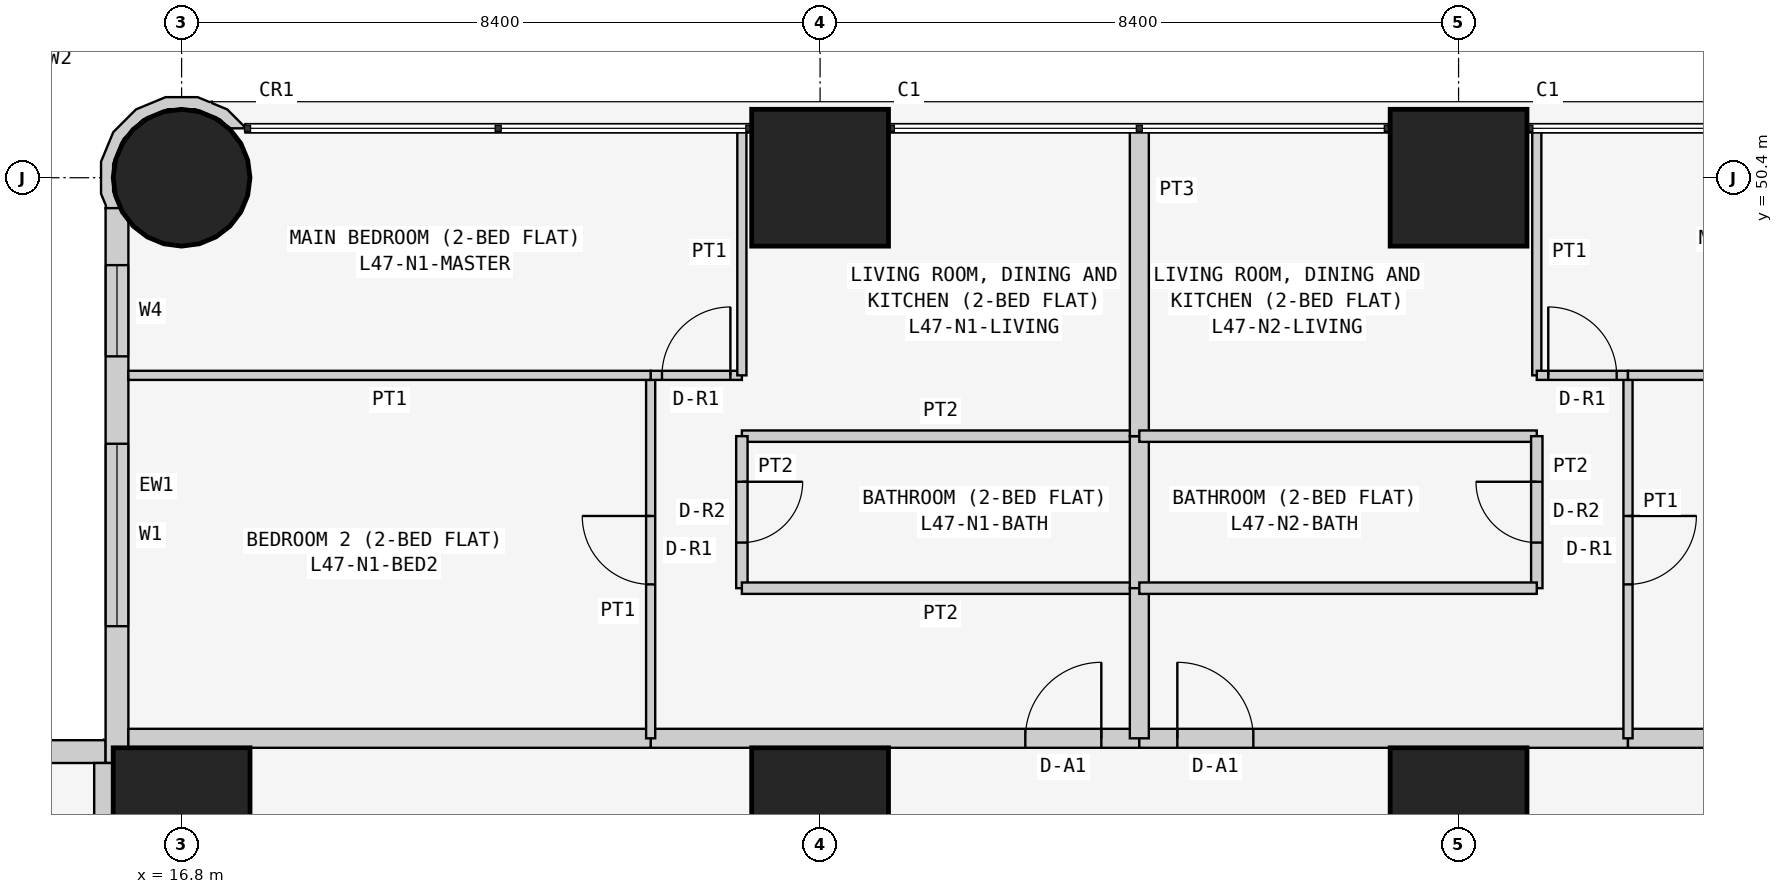
"""IFC4 building model, lengths in metres.
Left out: names, types, materials, properties, quantities, classifications, styles, units other than length and angle.
Written with IfcOpenShell. Run it as: python <this file> out.ifc"""

import sys

from ifc_helpers import new_model, si_unit, direction, frame, frame_2d, origin, origin_2d, place, context, subcontext, project, spatial, polyline, rectangle, circle, outline, extrude, element, fill, save


model = new_model("IFC4")
c1 = context("Model", 3, precision=1e-05, world=origin(), true_north=direction((0.0, 1.0)))
c2 = subcontext(c1, "Body", "Model", "MODEL_VIEW")
j1 = project(units=[si_unit("LENGTHUNIT", "METRE"), si_unit("PLANEANGLEUNIT", "RADIAN")], contexts=[c1])
p1 = place(None, origin())
s1 = spatial("IfcSite", under=j1, at=p1, CompositionType="ELEMENT")
p2 = place(p1, origin())
s2 = spatial("IfcBuilding", under=s1, at=p2, CompositionType="ELEMENT")
p3 = place(p2, frame((0.0, 0.0, 183.3)))
s3 = spatial("IfcBuildingStorey", under=s2, at=p3, CompositionType="ELEMENT", Elevation=183.3)
p4 = place(p3, frame((16.8, 42.0, 0.0), z_axis=(0.0, 0.0, 1.0), x_axis=(1.0, 0.0, 0.0)))
e1 = element("IfcColumn", 1, at=p4, inside=s3, PredefinedType="COLUMN", context=c2, shape_type="SweptSolid", body=[
    extrude(rectangle(XDim=1.8, YDim=1.8, at=origin_2d()), origin(), (0.0, 0.0, 1.0), 3.6),
])
p5 = place(p3, frame((16.8, 50.4, 0.0), z_axis=(0.0, 0.0, 1.0), x_axis=(1.0, 0.0, 0.0)))
e2 = element("IfcColumn", 2, at=p5, inside=s3, PredefinedType="COLUMN", context=c2, shape_type="SweptSolid", body=[
    extrude(circle(Radius=0.9, at=origin_2d()), origin(), (0.0, 0.0, 1.0), 3.6),
])
for number, where, z_axis, x_axis in (
    (3, (25.2, 42.0, 0.0), (0.0, 0.0, 1.0), (1.0, 0.0, 0.0)),
    (4, (25.2, 50.4, 0.0), (0.0, 0.0, 1.0), (1.0, 0.0, 0.0)),
    (5, (33.6, 42.0, 0.0), (0.0, 0.0, 1.0), (1.0, 0.0, 0.0)),
    (6, (33.6, 50.4, 0.0), (0.0, 0.0, 1.0), (1.0, 0.0, 0.0)),
):
    element("IfcColumn", number, at=place(p3, frame(where, z_axis=z_axis, x_axis=x_axis)), inside=s3, PredefinedType="COLUMN", context=c2, shape_type="SweptSolid", body=[
        extrude(rectangle(XDim=1.8, YDim=1.8, at=origin_2d()), origin(), (0.0, 0.0, 1.0), 3.6),
    ])
p6 = place(p3, frame((15.8, 42.85, 0.0), z_axis=(0.0, 0.0, 1.0), x_axis=(-1.0, 0.0, 0.0)))
e7 = element("IfcWall", 7, at=p6, inside=s3, PredefinedType="SOLIDWALL", context=c2, shape_type="SweptSolid", body=[
    extrude(rectangle(XDim=15.4, YDim=0.3, at=frame_2d((7.7, 0.0))), origin(), (0.0, 0.0, 1.0), 3.45),
])
p7 = place(p6, frame((1.2, 0.0, 0.9)))
e8 = element("IfcOpeningElement", 8, at=p7, cuts=e7, PredefinedType="OPENING", context=c2, shape_type="SweptSolid", body=[
    extrude(rectangle(XDim=1.8, YDim=1.5, at=frame_2d((0.9, 0.75))), frame((0.0, 0.16, 0.0), z_axis=(0.0, -1.0, 0.0), x_axis=(1.0, 0.0, 0.0)), (0.0, 0.0, 1.0), 0.32),
])
p8 = place(p6, frame((4.95, 0.0, 1.5)))
e9 = element("IfcOpeningElement", 9, at=p8, cuts=e7, PredefinedType="OPENING", context=c2, shape_type="SweptSolid", body=[
    extrude(rectangle(XDim=0.9, YDim=0.7, at=frame_2d((0.45, 0.35))), frame((0.0, 0.16, 0.0), z_axis=(0.0, -1.0, 0.0), x_axis=(1.0, 0.0, 0.0)), (0.0, 0.0, 1.0), 0.32),
])
p9 = place(p6, frame((8.5, 0.0, 0.9)))
e10 = element("IfcOpeningElement", 10, at=p9, cuts=e7, PredefinedType="OPENING", context=c2, shape_type="SweptSolid", body=[
    extrude(rectangle(XDim=1.8, YDim=1.5, at=frame_2d((0.9, 0.75))), frame((0.0, 0.16, 0.0), z_axis=(0.0, -1.0, 0.0), x_axis=(1.0, 0.0, 0.0)), (0.0, 0.0, 1.0), 0.32),
])
p10 = place(p6, frame((12.5, 0.0, 0.0)))
e11 = element("IfcOpeningElement", 11, at=p10, cuts=e7, PredefinedType="OPENING", context=c2, shape_type="SweptSolid", body=[
    extrude(rectangle(XDim=0.9, YDim=2.4, at=frame_2d((0.45, 1.2))), frame((0.0, 0.16, 0.0), z_axis=(0.0, -1.0, 0.0), x_axis=(1.0, 0.0, 0.0)), (0.0, 0.0, 1.0), 0.32),
])
p11 = place(p6, frame((13.5, 0.0, 0.9)))
e12 = element("IfcOpeningElement", 12, at=p11, cuts=e7, PredefinedType="OPENING", context=c2, shape_type="SweptSolid", body=[
    extrude(rectangle(XDim=1.2, YDim=1.5, at=frame_2d((0.6, 0.75))), frame((0.0, 0.16, 0.0), z_axis=(0.0, -1.0, 0.0), x_axis=(1.0, 0.0, 0.0)), (0.0, 0.0, 1.0), 0.32),
])
p12 = place(p3, frame((15.95, 50.0, 0.0), z_axis=(0.0, 0.0, 1.0), x_axis=(0.0, -1.0, 0.0)))
e13 = element("IfcWall", 13, at=p12, inside=s3, PredefinedType="SOLIDWALL", context=c2, shape_type="SweptSolid", body=[
    extrude(rectangle(XDim=7.3, YDim=0.3, at=frame_2d((3.65, 0.0))), origin(), (0.0, 0.0, 1.0), 3.45),
])
p13 = place(p12, frame((3.1, 0.0, 0.9)))
e14 = element("IfcOpeningElement", 14, at=p13, cuts=e13, PredefinedType="OPENING", context=c2, shape_type="SweptSolid", body=[
    extrude(rectangle(XDim=2.4, YDim=1.5, at=frame_2d((1.2, 0.75))), frame((0.0, 0.16, 0.0), z_axis=(0.0, -1.0, 0.0), x_axis=(1.0, 0.0, 0.0)), (0.0, 0.0, 1.0), 0.32),
])
p14 = place(p12, frame((0.75, 0.0, 0.9)))
e15 = element("IfcOpeningElement", 15, at=p14, cuts=e13, PredefinedType="OPENING", context=c2, shape_type="SweptSolid", body=[
    extrude(rectangle(XDim=1.2, YDim=1.5, at=frame_2d((0.6, 0.75))), frame((0.0, 0.16, 0.0), z_axis=(0.0, -1.0, 0.0), x_axis=(1.0, 0.0, 0.0)), (0.0, 0.0, 1.0), 0.32),
])
p15 = place(p3, frame((17.567, 51.011, 0.0), z_axis=(0.0, 0.0, 1.0), x_axis=(-0.377204953059, 0.926129809145, 0.0)))
e16 = element("IfcWall", 16, at=p15, inside=s3, PredefinedType="SOLIDWALL", context=c2, shape_type="SweptSolid", body=[
    extrude(outline(polyline([(-0.27, 2.017), (-0.37, 1.841), (-0.102, 1.842), (0.23, 1.707), (0.485, 1.455), (0.624, 1.125), (0.626, 0.766), (0.491, 0.434), (0.239, 0.18), (0.09, 0.117), (0.011, -0.078), (0.025, -0.083), (0.329, 0.045), (0.48, 0.197), (0.499, 0.193), (0.507, 0.225), (0.626, 0.345), (0.785, 0.736), (0.782, 1.157), (0.619, 1.546), (0.319, 1.842), (-0.072, 2.001), (-0.24, 2.0), (-0.27, 2.017)])), origin(), (0.0, 0.0, 1.0), 3.45),
])
p16 = place(p3, frame((22.971, 43.025, 0.0), z_axis=(0.0, 0.0, 1.0), x_axis=(1.0, 0.0, 0.0)))
e17 = element("IfcWall", 17, at=p16, inside=s3, PredefinedType="PARTITIONING", context=c2, shape_type="SweptSolid", body=[
    extrude(rectangle(XDim=6.429, YDim=0.25, at=frame_2d((3.214, 0.0))), origin(), (0.0, 0.0, 1.0), 3.45),
])
p17 = place(p16, frame((4.929, 0.0, 0.0)))
e18 = element("IfcOpeningElement", 18, at=p17, cuts=e17, PredefinedType="OPENING", context=c2, shape_type="SweptSolid", body=[
    extrude(rectangle(XDim=1.0, YDim=2.1, at=frame_2d((0.5, 1.05))), frame((0.0, 0.135, 0.0), z_axis=(0.0, -1.0, 0.0), x_axis=(1.0, 0.0, 0.0)), (0.0, 0.0, 1.0), 0.27),
])
p18 = place(p3, frame((16.1, 43.025, 0.0), z_axis=(0.0, 0.0, 1.0), x_axis=(1.0, 0.0, 0.0)))
e19 = element("IfcWall", 19, at=p18, inside=s3, PredefinedType="PARTITIONING", context=c2, shape_type="SweptSolid", body=[
    extrude(rectangle(XDim=6.871, YDim=0.25, at=frame_2d((3.436, 0.0))), origin(), (0.0, 0.0, 1.0), 3.45),
])
p19 = place(p3, frame((29.4, 43.025, 0.0), z_axis=(0.0, 0.0, 1.0), x_axis=(1.0, 0.0, 0.0)))
e20 = element("IfcWall", 20, at=p19, inside=s3, PredefinedType="PARTITIONING", context=c2, shape_type="SweptSolid", body=[
    extrude(rectangle(XDim=6.429, YDim=0.25, at=frame_2d((3.215, 0.0))), origin(), (0.0, 0.0, 1.0), 3.45),
])
p20 = place(p19, frame((0.5, 0.0, 0.0)))
e21 = element("IfcOpeningElement", 21, at=p20, cuts=e20, PredefinedType="OPENING", context=c2, shape_type="SweptSolid", body=[
    extrude(rectangle(XDim=1.0, YDim=2.1, at=frame_2d((0.5, 1.05))), frame((0.0, 0.135, 0.0), z_axis=(0.0, -1.0, 0.0), x_axis=(1.0, 0.0, 0.0)), (0.0, 0.0, 1.0), 0.27),
])
for number, where, z_axis, x_axis in (
    (22, (35.829, 43.025, 0.0), (0.0, 0.0, 1.0), (1.0, 0.0, 0.0)),
    (23, (15.775, 35.829, 0.0), (0.0, 0.0, 1.0), (0.0, 1.0, 0.0)),
):
    element("IfcWall", number, at=place(p3, frame(where, z_axis=z_axis, x_axis=x_axis)), inside=s3, PredefinedType="PARTITIONING", context=c2, shape_type="SweptSolid", body=[
        extrude(rectangle(XDim=6.871, YDim=0.25, at=frame_2d((3.436, 0.0))), origin(), (0.0, 0.0, 1.0), 3.45),
    ])
p21 = place(p3, frame((29.4, 47.0, 0.0), z_axis=(0.0, 0.0, 1.0), x_axis=(-1.0, 0.0, 0.0)))
e24 = element("IfcWall", 24, at=p21, inside=s3, PredefinedType="PARTITIONING", context=c2, shape_type="SweptSolid", body=[
    extrude(rectangle(XDim=5.229, YDim=0.15, at=frame_2d((2.615, 0.0))), origin(), (0.0, 0.0, 1.0), 3.45),
])
p22 = place(p3, frame((24.171, 47.0, 0.0), z_axis=(0.0, 0.0, 1.0), x_axis=(0.0, -1.0, 0.0)))
e25 = element("IfcWall", 25, at=p22, inside=s3, PredefinedType="PARTITIONING", context=c2, shape_type="SweptSolid", body=[
    extrude(rectangle(XDim=2.0, YDim=0.15, at=frame_2d((1.0, 0.0))), origin(), (0.0, 0.0, 1.0), 3.45),
])
p23 = place(p22, frame((0.6, 0.0, 0.0)))
e26 = element("IfcOpeningElement", 26, at=p23, cuts=e25, PredefinedType="OPENING", context=c2, shape_type="SweptSolid", body=[
    extrude(rectangle(XDim=0.8, YDim=2.1, at=frame_2d((0.4, 1.05))), frame((0.0, 0.085, 0.0), z_axis=(0.0, -1.0, 0.0), x_axis=(1.0, 0.0, 0.0)), (0.0, 0.0, 1.0), 0.17),
])
p24 = place(p3, frame((24.171, 45.0, 0.0), z_axis=(0.0, 0.0, 1.0), x_axis=(1.0, 0.0, 0.0)))
e27 = element("IfcWall", 27, at=p24, inside=s3, PredefinedType="PARTITIONING", context=c2, shape_type="SweptSolid", body=[
    extrude(rectangle(XDim=5.229, YDim=0.15, at=frame_2d((2.615, 0.0))), origin(), (0.0, 0.0, 1.0), 3.45),
])
p25 = place(p3, frame((29.4, 45.0, 0.0), z_axis=(0.0, 0.0, 1.0), x_axis=(0.0, 1.0, 0.0)))
e28 = element("IfcWall", 28, at=p25, inside=s3, PredefinedType="PARTITIONING", context=c2, shape_type="SweptSolid", body=[
    extrude(rectangle(XDim=2.0, YDim=0.25, at=frame_2d((1.0, 0.0))), origin(), (0.0, 0.0, 1.0), 2.848),
])
p26 = place(p3, frame((22.971, 43.025, 0.0), z_axis=(0.0, 0.0, 1.0), x_axis=(0.0, 1.0, 0.0)))
e29 = element("IfcWall", 29, at=p26, inside=s3, PredefinedType="PARTITIONING", context=c2, shape_type="SweptSolid", body=[
    extrude(rectangle(XDim=4.775, YDim=0.12, at=frame_2d((2.388, 0.0))), origin(), (0.0, 0.0, 1.0), 3.45),
])
p27 = place(p26, frame((2.025, 0.0, 0.0)))
e30 = element("IfcOpeningElement", 30, at=p27, cuts=e29, PredefinedType="OPENING", context=c2, shape_type="SweptSolid", body=[
    extrude(rectangle(XDim=0.9, YDim=2.1, at=frame_2d((0.45, 1.05))), frame((0.0, 0.07, 0.0), z_axis=(0.0, -1.0, 0.0), x_axis=(1.0, 0.0, 0.0)), (0.0, 0.0, 1.0), 0.14),
])
p28 = place(p3, frame((22.971, 47.8, 0.0), z_axis=(0.0, 0.0, 1.0), x_axis=(1.0, 0.0, 0.0)))
e31 = element("IfcWall", 31, at=p28, inside=s3, PredefinedType="PARTITIONING", context=c2, shape_type="SweptSolid", body=[
    extrude(rectangle(XDim=1.2, YDim=0.12, at=frame_2d((0.6, 0.0))), origin(), (0.0, 0.0, 1.0), 3.45),
])
p29 = place(p28, frame((0.149, 0.0, 0.0)))
e32 = element("IfcOpeningElement", 32, at=p29, cuts=e31, PredefinedType="OPENING", context=c2, shape_type="SweptSolid", body=[
    extrude(rectangle(XDim=0.9, YDim=2.1, at=frame_2d((0.45, 1.05))), frame((0.0, 0.07, 0.0), z_axis=(0.0, -1.0, 0.0), x_axis=(1.0, 0.0, 0.0)), (0.0, 0.0, 1.0), 0.14),
])
p30 = place(p3, frame((24.171, 47.8, 0.0), z_axis=(0.0, 0.0, 1.0), x_axis=(0.0, 1.0, 0.0)))
e33 = element("IfcWall", 33, at=p30, inside=s3, PredefinedType="PARTITIONING", context=c2, shape_type="SweptSolid", body=[
    extrude(rectangle(XDim=3.25, YDim=0.12, at=frame_2d((1.625, 0.0))), origin(), (0.0, 0.0, 1.0), 3.45),
])
p31 = place(p3, frame((29.4, 45.0, 0.0), z_axis=(0.0, 0.0, 1.0), x_axis=(0.0, -1.0, 0.0)))
e34 = element("IfcWall", 34, at=p31, inside=s3, PredefinedType="PARTITIONING", context=c2, shape_type="SweptSolid", body=[
    extrude(rectangle(XDim=1.975, YDim=0.25, at=frame_2d((0.988, 0.0))), origin(), (0.0, 0.0, 1.0), 2.848),
])
p32 = place(p3, frame((29.4, 51.05, 0.0), z_axis=(0.0, 0.0, 1.0), x_axis=(0.0, -1.0, 0.0)))
e35 = element("IfcWall", 35, at=p32, inside=s3, PredefinedType="PARTITIONING", context=c2, shape_type="SweptSolid", body=[
    extrude(rectangle(XDim=4.05, YDim=0.25, at=frame_2d((2.025, 0.0))), origin(), (0.0, 0.0, 1.0), 2.848),
])
p33 = place(p3, frame((22.971, 47.8, 0.0), z_axis=(0.0, 0.0, 1.0), x_axis=(-1.0, 0.0, 0.0)))
e36 = element("IfcWall", 36, at=p33, inside=s3, PredefinedType="PARTITIONING", context=c2, shape_type="SweptSolid", body=[
    extrude(rectangle(XDim=6.871, YDim=0.12, at=frame_2d((3.436, 0.0))), origin(), (0.0, 0.0, 1.0), 3.45),
])
p34 = place(p3, frame((29.4, 47.0, 0.0), z_axis=(0.0, 0.0, 1.0), x_axis=(1.0, 0.0, 0.0)))
e37 = element("IfcWall", 37, at=p34, inside=s3, PredefinedType="PARTITIONING", context=c2, shape_type="SweptSolid", body=[
    extrude(rectangle(XDim=5.229, YDim=0.15, at=frame_2d((2.615, 0.0))), origin(), (0.0, 0.0, 1.0), 3.45),
])
p35 = place(p3, frame((34.629, 47.0, 0.0), z_axis=(0.0, 0.0, 1.0), x_axis=(0.0, -1.0, 0.0)))
e38 = element("IfcWall", 38, at=p35, inside=s3, PredefinedType="PARTITIONING", context=c2, shape_type="SweptSolid", body=[
    extrude(rectangle(XDim=2.0, YDim=0.15, at=frame_2d((1.0, 0.0))), origin(), (0.0, 0.0, 1.0), 3.45),
])
p36 = place(p35, frame((0.6, 0.0, 0.0)))
e39 = element("IfcOpeningElement", 39, at=p36, cuts=e38, PredefinedType="OPENING", context=c2, shape_type="SweptSolid", body=[
    extrude(rectangle(XDim=0.8, YDim=2.1, at=frame_2d((0.4, 1.05))), frame((0.0, 0.085, 0.0), z_axis=(0.0, -1.0, 0.0), x_axis=(1.0, 0.0, 0.0)), (0.0, 0.0, 1.0), 0.17),
])
p37 = place(p3, frame((34.629, 45.0, 0.0), z_axis=(0.0, 0.0, 1.0), x_axis=(-1.0, 0.0, 0.0)))
e40 = element("IfcWall", 40, at=p37, inside=s3, PredefinedType="PARTITIONING", context=c2, shape_type="SweptSolid", body=[
    extrude(rectangle(XDim=5.229, YDim=0.15, at=frame_2d((2.615, 0.0))), origin(), (0.0, 0.0, 1.0), 3.45),
])
p38 = place(p3, frame((35.829, 47.8, 0.0), z_axis=(0.0, 0.0, 1.0), x_axis=(0.0, -1.0, 0.0)))
e41 = element("IfcWall", 41, at=p38, inside=s3, PredefinedType="PARTITIONING", context=c2, shape_type="SweptSolid", body=[
    extrude(rectangle(XDim=4.775, YDim=0.12, at=frame_2d((2.388, 0.0))), origin(), (0.0, 0.0, 1.0), 3.45),
])
p39 = place(p38, frame((1.85, 0.0, 0.0)))
e42 = element("IfcOpeningElement", 42, at=p39, cuts=e41, PredefinedType="OPENING", context=c2, shape_type="SweptSolid", body=[
    extrude(rectangle(XDim=0.9, YDim=2.1, at=frame_2d((0.45, 1.05))), frame((0.0, 0.07, 0.0), z_axis=(0.0, -1.0, 0.0), x_axis=(1.0, 0.0, 0.0)), (0.0, 0.0, 1.0), 0.14),
])
p40 = place(p3, frame((34.629, 51.05, 0.0), z_axis=(0.0, 0.0, 1.0), x_axis=(0.0, -1.0, 0.0)))
e43 = element("IfcWall", 43, at=p40, inside=s3, PredefinedType="PARTITIONING", context=c2, shape_type="SweptSolid", body=[
    extrude(rectangle(XDim=3.25, YDim=0.12, at=frame_2d((1.625, 0.0))), origin(), (0.0, 0.0, 1.0), 3.45),
])
p41 = place(p3, frame((34.629, 47.8, 0.0), z_axis=(0.0, 0.0, 1.0), x_axis=(1.0, 0.0, 0.0)))
e44 = element("IfcWall", 44, at=p41, inside=s3, PredefinedType="PARTITIONING", context=c2, shape_type="SweptSolid", body=[
    extrude(rectangle(XDim=1.2, YDim=0.12, at=frame_2d((0.6, 0.0))), origin(), (0.0, 0.0, 1.0), 3.45),
])
p42 = place(p41, frame((0.151, 0.0, 0.0)))
e45 = element("IfcOpeningElement", 45, at=p42, cuts=e44, PredefinedType="OPENING", context=c2, shape_type="SweptSolid", body=[
    extrude(rectangle(XDim=0.9, YDim=2.1, at=frame_2d((0.45, 1.05))), frame((0.0, 0.07, 0.0), z_axis=(0.0, -1.0, 0.0), x_axis=(1.0, 0.0, 0.0)), (0.0, 0.0, 1.0), 0.14),
])
p43 = place(p3, frame((35.829, 47.8, 0.0), z_axis=(0.0, 0.0, 1.0), x_axis=(1.0, 0.0, 0.0)))
e46 = element("IfcWall", 46, at=p43, inside=s3, PredefinedType="PARTITIONING", context=c2, shape_type="SweptSolid", body=[
    extrude(rectangle(XDim=6.871, YDim=0.12, at=frame_2d((3.436, 0.0))), origin(), (0.0, 0.0, 1.0), 3.45),
])
p44 = place(p13, origin())
e47 = element("IfcWindow", 47, at=p44, inside=s3, PartitioningType="SINGLE_PANEL", PredefinedType="WINDOW", context=c2, shape_type="SweptSolid", body=[
    extrude(rectangle(XDim=2.4, YDim=1.5, at=frame_2d((1.2, 0.75))), frame((0.0, 0.03, 0.0), z_axis=(0.0, -1.0, 0.0), x_axis=(1.0, 0.0, 0.0)), (0.0, 0.0, 1.0), 0.06),
])
fill(e14, e47)
p45 = place(p14, origin())
e48 = element("IfcWindow", 48, at=p45, inside=s3, PartitioningType="SINGLE_PANEL", PredefinedType="WINDOW", context=c2, shape_type="SweptSolid", body=[
    extrude(rectangle(XDim=1.2, YDim=1.5, at=frame_2d((0.6, 0.75))), frame((0.0, 0.03, 0.0), z_axis=(0.0, -1.0, 0.0), x_axis=(1.0, 0.0, 0.0)), (0.0, 0.0, 1.0), 0.06),
])
fill(e15, e48)
p46 = place(p17, origin())
e49 = element("IfcDoor", 49, at=p46, inside=s3, OperationType="SINGLE_SWING_RIGHT", PredefinedType="DOOR", context=c2, shape_type="SweptSolid", body=[
    extrude(rectangle(XDim=1.0, YDim=2.1, at=frame_2d((0.5, 1.05))), frame((0.0, 0.025, 0.0), z_axis=(0.0, -1.0, 0.0), x_axis=(1.0, 0.0, 0.0)), (0.0, 0.0, 1.0), 0.05),
])
fill(e18, e49)
p47 = place(p23, origin())
e50 = element("IfcDoor", 50, at=p47, inside=s3, OperationType="SINGLE_SWING_LEFT", PredefinedType="DOOR", context=c2, shape_type="SweptSolid", body=[
    extrude(rectangle(XDim=0.8, YDim=2.1, at=frame_2d((0.4, 1.05))), frame((0.0, 0.025, 0.0), z_axis=(0.0, -1.0, 0.0), x_axis=(1.0, 0.0, 0.0)), (0.0, 0.0, 1.0), 0.05),
])
fill(e26, e50)
p48 = place(p27, origin())
e51 = element("IfcDoor", 51, at=p48, inside=s3, OperationType="SINGLE_SWING_RIGHT", PredefinedType="DOOR", context=c2, shape_type="SweptSolid", body=[
    extrude(rectangle(XDim=0.9, YDim=2.1, at=frame_2d((0.45, 1.05))), frame((0.0, 0.025, 0.0), z_axis=(0.0, -1.0, 0.0), x_axis=(1.0, 0.0, 0.0)), (0.0, 0.0, 1.0), 0.05),
])
fill(e30, e51)
p49 = place(p29, origin())
e52 = element("IfcDoor", 52, at=p49, inside=s3, OperationType="SINGLE_SWING_RIGHT", PredefinedType="DOOR", context=c2, shape_type="SweptSolid", body=[
    extrude(rectangle(XDim=0.9, YDim=2.1, at=frame_2d((0.45, 1.05))), frame((0.0, 0.025, 0.0), z_axis=(0.0, -1.0, 0.0), x_axis=(1.0, 0.0, 0.0)), (0.0, 0.0, 1.0), 0.05),
])
fill(e32, e52)
p50 = place(p20, origin())
e53 = element("IfcDoor", 53, at=p50, inside=s3, OperationType="SINGLE_SWING_LEFT", PredefinedType="DOOR", context=c2, shape_type="SweptSolid", body=[
    extrude(rectangle(XDim=1.0, YDim=2.1, at=frame_2d((0.5, 1.05))), frame((0.0, 0.025, 0.0), z_axis=(0.0, -1.0, 0.0), x_axis=(1.0, 0.0, 0.0)), (0.0, 0.0, 1.0), 0.05),
])
fill(e21, e53)
p51 = place(p36, frame((0.8, 0.0, 0.0), z_axis=(0.0, 0.0, 1.0), x_axis=(-1.0, 0.0, 0.0)))
e54 = element("IfcDoor", 54, at=p51, inside=s3, OperationType="SINGLE_SWING_RIGHT", PredefinedType="DOOR", context=c2, shape_type="SweptSolid", body=[
    extrude(rectangle(XDim=0.8, YDim=2.1, at=frame_2d((0.4, 1.05))), frame((0.0, 0.025, 0.0), z_axis=(0.0, -1.0, 0.0), x_axis=(1.0, 0.0, 0.0)), (0.0, 0.0, 1.0), 0.05),
])
fill(e39, e54)
p52 = place(p39, origin())
e55 = element("IfcDoor", 55, at=p52, inside=s3, OperationType="SINGLE_SWING_LEFT", PredefinedType="DOOR", context=c2, shape_type="SweptSolid", body=[
    extrude(rectangle(XDim=0.9, YDim=2.1, at=frame_2d((0.45, 1.05))), frame((0.0, 0.025, 0.0), z_axis=(0.0, -1.0, 0.0), x_axis=(1.0, 0.0, 0.0)), (0.0, 0.0, 1.0), 0.05),
])
fill(e42, e55)
p53 = place(p42, origin())
e56 = element("IfcDoor", 56, at=p53, inside=s3, OperationType="SINGLE_SWING_LEFT", PredefinedType="DOOR", context=c2, shape_type="SweptSolid", body=[
    extrude(rectangle(XDim=0.9, YDim=2.1, at=frame_2d((0.45, 1.05))), frame((0.0, 0.025, 0.0), z_axis=(0.0, -1.0, 0.0), x_axis=(1.0, 0.0, 0.0)), (0.0, 0.0, 1.0), 0.05),
])
fill(e45, e56)
save(model, sys.argv[1])
